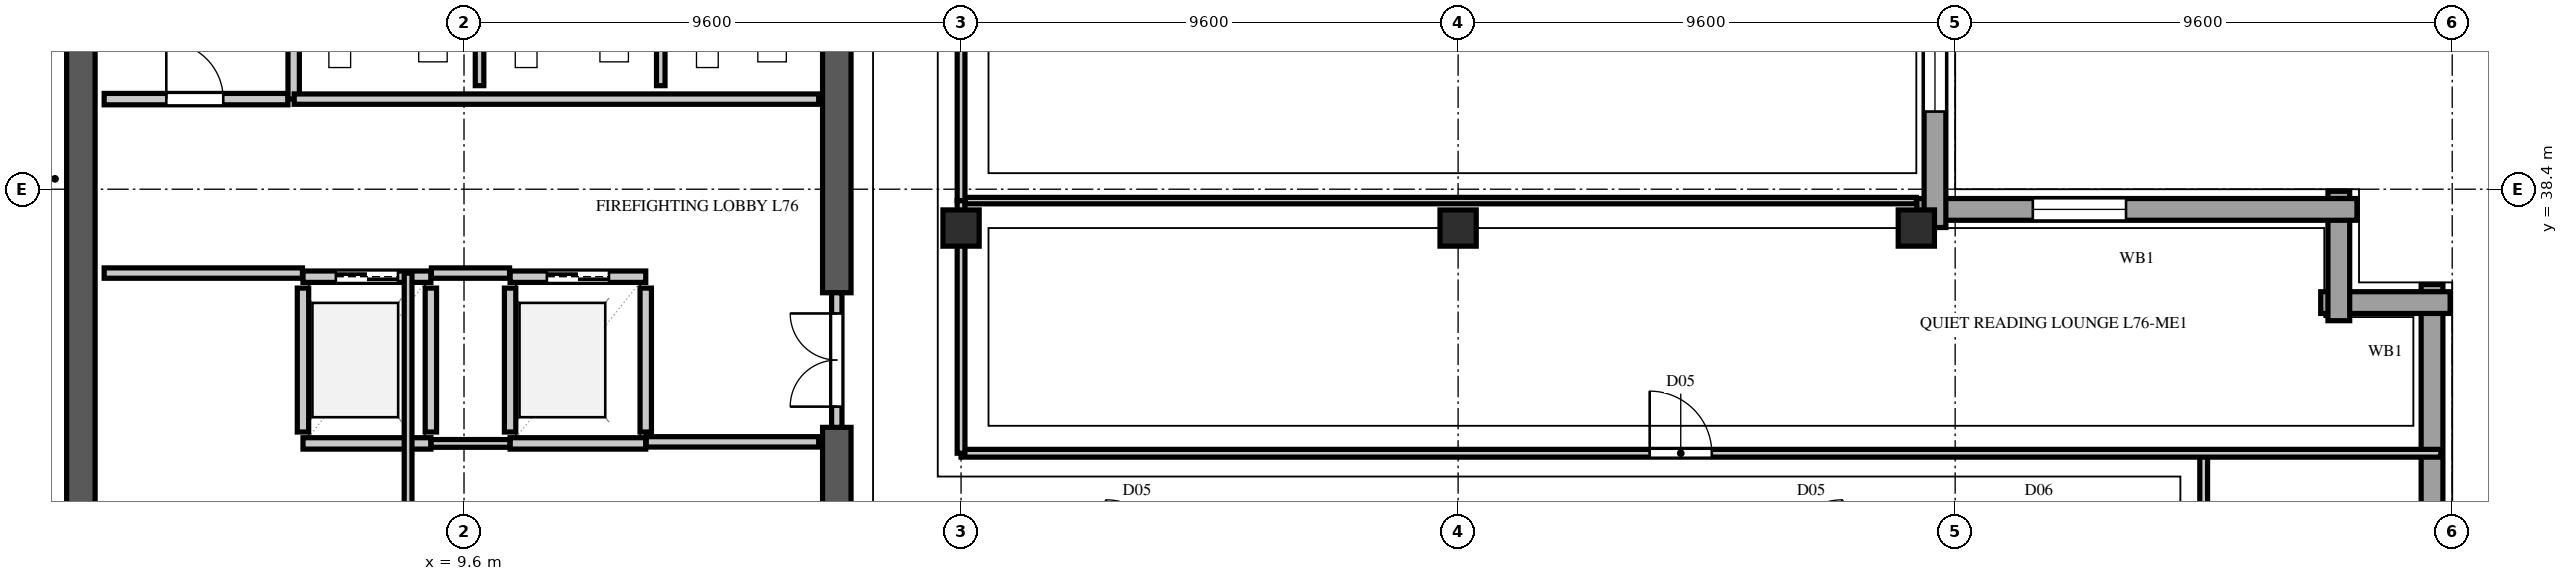
"""IFC4 building model, lengths in metres.
Left out: names, types, materials, properties, quantities, classifications, styles, units other than length and angle.
Written with IfcOpenShell. Run it as: python <this file> out.ifc"""

import sys

from ifc_helpers import new_model, si_unit, direction, frame, frame_2d, origin, origin_2d, place, context, subcontext, project, spatial, rectangle, extrude, element, fill, save


model = new_model("IFC4")
c1 = context("Model", 3, precision=1e-05, world=origin(), true_north=direction((0.0, 1.0)))
c2 = subcontext(c1, "Body", "Model", "MODEL_VIEW")
j1 = project(units=[si_unit("LENGTHUNIT", "METRE"), si_unit("PLANEANGLEUNIT", "RADIAN")], contexts=[c1])
p1 = place(None, origin())
s1 = spatial("IfcSite", under=j1, at=p1, CompositionType="ELEMENT")
p2 = place(p1, origin())
s2 = spatial("IfcBuilding", under=s1, at=p2, CompositionType="ELEMENT")
p3 = place(p2, frame((0.0, 0.0, 300.0)))
s3 = spatial("IfcBuildingStorey", under=s2, at=p3, CompositionType="ELEMENT", Elevation=300.0)
p4 = place(p3, frame((2.2, 9.325, 0.0), z_axis=(0.0, 0.0, 1.0), x_axis=(0.0, 1.0, 0.0)))
e1 = element("IfcWall", 1, at=p4, inside=s3, PredefinedType="SHEAR", context=c2, shape_type="SweptSolid", body=[
    extrude(rectangle(XDim=38.95, YDim=0.55, at=frame_2d((19.475, 0.0))), origin(), (0.0, 0.0, 1.0), 3.54),
])
p5 = place(p3, frame((16.8, 26.0, 0.0), z_axis=(0.0, 0.0, 1.0), x_axis=(0.0, 1.0, 0.0)))
e2 = element("IfcWall", 2, at=p5, inside=s3, PredefinedType="SHEAR", context=c2, shape_type="SweptSolid", body=[
    extrude(rectangle(XDim=7.8, YDim=0.55, at=frame_2d((3.9, 0.0))), origin(), (0.0, 0.0, 1.0), 3.54),
])
p6 = place(p3, frame((16.8, 36.4, 0.0), z_axis=(0.0, 0.0, 1.0), x_axis=(0.0, 1.0, 0.0)))
e3 = element("IfcWall", 3, at=p6, inside=s3, PredefinedType="SHEAR", context=c2, shape_type="SweptSolid", body=[
    extrude(rectangle(XDim=11.325, YDim=0.55, at=frame_2d((5.663, 0.0))), origin(), (0.0, 0.0, 1.0), 3.54),
])
p7 = place(p6, frame((9.2, 0.0, 0.0)))
e4 = element("IfcOpeningElement", 4, at=p7, cuts=e3, PredefinedType="OPENING", context=c2, shape_type="SweptSolid", body=[
    extrude(rectangle(XDim=0.95, YDim=2.15, at=frame_2d((0.475, 1.075))), frame((0.0, 0.287, 0.0), z_axis=(0.0, -1.0, 0.0), x_axis=(1.0, 0.0, 0.0)), (0.0, 0.0, 1.0), 0.574),
])
for number, where, z_axis, x_axis in (
    (5, (19.2, 37.65, 0.0), (0.0, 0.0, 1.0), (1.0, 0.0, 0.0)),
    (6, (28.8, 37.65, 0.0), (0.0, 0.0, 1.0), (1.0, 0.0, 0.0)),
    (7, (37.65, 37.65, 0.0), (0.0, 0.0, 1.0), (1.0, 0.0, 0.0)),
):
    element("IfcColumn", number, at=place(p3, frame(where, z_axis=z_axis, x_axis=x_axis)), inside=s3, PredefinedType="COLUMN", context=c2, shape_type="SweptSolid", body=[
        extrude(rectangle(XDim=0.7, YDim=0.7, at=origin_2d()), origin(), (0.0, 0.0, 1.0), 3.8),
    ])
p8 = place(p3, frame((47.61, 1.84, 0.0), z_axis=(0.0, 0.0, 1.0), x_axis=(0.0, 1.0, 0.0)))
e8 = element("IfcWall", 8, at=p8, inside=s3, PredefinedType="SOLIDWALL", context=c2, shape_type="SweptSolid", body=[
    extrude(rectangle(XDim=34.72, YDim=0.42, at=frame_2d((17.36, 0.0))), origin(), (0.0, 0.0, 1.0), 3.54),
])
p9 = place(p8, frame((4.61, 0.0, 0.85)))
e9 = element("IfcOpeningElement", 9, at=p9, cuts=e8, PredefinedType="OPENING", context=c2, shape_type="SweptSolid", body=[
    extrude(rectangle(XDim=1.5, YDim=1.85, at=frame_2d((0.75, 0.925))), frame((0.0, 0.222, 0.0), z_axis=(0.0, -1.0, 0.0), x_axis=(1.0, 0.0, 0.0)), (0.0, 0.0, 1.0), 0.444),
])
p10 = place(p8, frame((9.41, 0.0, 0.85)))
e10 = element("IfcOpeningElement", 10, at=p10, cuts=e8, PredefinedType="OPENING", context=c2, shape_type="SweptSolid", body=[
    extrude(rectangle(XDim=1.5, YDim=1.85, at=frame_2d((0.75, 0.925))), frame((0.0, 0.222, 0.0), z_axis=(0.0, -1.0, 0.0), x_axis=(1.0, 0.0, 0.0)), (0.0, 0.0, 1.0), 0.444),
])
p11 = place(p8, frame((14.21, 0.0, 0.85)))
e11 = element("IfcOpeningElement", 11, at=p11, cuts=e8, PredefinedType="OPENING", context=c2, shape_type="SweptSolid", body=[
    extrude(rectangle(XDim=1.5, YDim=1.85, at=frame_2d((0.75, 0.925))), frame((0.0, 0.222, 0.0), z_axis=(0.0, -1.0, 0.0), x_axis=(1.0, 0.0, 0.0)), (0.0, 0.0, 1.0), 0.444),
])
p12 = place(p8, frame((19.01, 0.0, 0.85)))
e12 = element("IfcOpeningElement", 12, at=p12, cuts=e8, PredefinedType="OPENING", context=c2, shape_type="SweptSolid", body=[
    extrude(rectangle(XDim=1.5, YDim=1.85, at=frame_2d((0.75, 0.925))), frame((0.0, 0.222, 0.0), z_axis=(0.0, -1.0, 0.0), x_axis=(1.0, 0.0, 0.0)), (0.0, 0.0, 1.0), 0.444),
])
p13 = place(p8, frame((23.81, 0.0, 0.85)))
e13 = element("IfcOpeningElement", 13, at=p13, cuts=e8, PredefinedType="OPENING", context=c2, shape_type="SweptSolid", body=[
    extrude(rectangle(XDim=1.5, YDim=1.85, at=frame_2d((0.75, 0.925))), frame((0.0, 0.222, 0.0), z_axis=(0.0, -1.0, 0.0), x_axis=(1.0, 0.0, 0.0)), (0.0, 0.0, 1.0), 0.444),
])
for number, where, z_axis, x_axis in (
    (14, (47.96, 36.21, 0.0), (0.0, 0.0, 1.0), (-1.0, 0.0, 0.0)),
    (15, (45.81, 35.86, 0.0), (0.0, 0.0, 1.0), (0.0, 1.0, 0.0)),
):
    element("IfcWall", number, at=place(p3, frame(where, z_axis=z_axis, x_axis=x_axis)), inside=s3, PredefinedType="SOLIDWALL", context=c2, shape_type="SweptSolid", body=[
        extrude(rectangle(XDim=2.5, YDim=0.42, at=frame_2d((1.25, 0.0))), origin(), (0.0, 0.0, 1.0), 3.54),
    ])
p14 = place(p3, frame((46.16, 38.01, 0.0), z_axis=(0.0, 0.0, 1.0), x_axis=(-1.0, 0.0, 0.0)))
e16 = element("IfcWall", 16, at=p14, inside=s3, PredefinedType="SOLIDWALL", context=c2, shape_type="SweptSolid", body=[
    extrude(rectangle(XDim=8.5, YDim=0.42, at=frame_2d((4.25, 0.0))), origin(), (0.0, 0.0, 1.0), 3.54),
])
p15 = place(p14, frame((4.46, 0.0, 0.85)))
e17 = element("IfcOpeningElement", 17, at=p15, cuts=e16, PredefinedType="OPENING", context=c2, shape_type="SweptSolid", body=[
    extrude(rectangle(XDim=1.8, YDim=1.85, at=frame_2d((0.9, 0.925))), frame((0.0, 0.222, 0.0), z_axis=(0.0, -1.0, 0.0), x_axis=(1.0, 0.0, 0.0)), (0.0, 0.0, 1.0), 0.444),
])
p16 = place(p3, frame((38.01, 37.66, 0.0), z_axis=(0.0, 0.0, 1.0), x_axis=(0.0, 1.0, 0.0)))
e18 = element("IfcWall", 18, at=p16, inside=s3, PredefinedType="SOLIDWALL", context=c2, shape_type="SweptSolid", body=[
    extrude(rectangle(XDim=8.5, YDim=0.42, at=frame_2d((4.25, 0.0))), origin(), (0.0, 0.0, 1.0), 3.54),
])
p17 = place(p16, frame((2.24, 0.0, 0.85)))
e19 = element("IfcOpeningElement", 19, at=p17, cuts=e18, PredefinedType="OPENING", context=c2, shape_type="SweptSolid", body=[
    extrude(rectangle(XDim=1.8, YDim=1.85, at=frame_2d((0.9, 0.925))), frame((0.0, 0.222, 0.0), z_axis=(0.0, -1.0, 0.0), x_axis=(1.0, 0.0, 0.0)), (0.0, 0.0, 1.0), 0.444),
])
p18 = place(p3, frame((2.65, 40.14, 0.0), z_axis=(0.0, 0.0, 1.0), x_axis=(1.0, 0.0, 0.0)))
e20 = element("IfcWall", 20, at=p18, inside=s3, PredefinedType="SOLIDWALL", context=c2, shape_type="SweptSolid", body=[
    extrude(rectangle(XDim=3.55, YDim=0.22, at=frame_2d((1.775, 0.0))), origin(), (0.0, 0.0, 1.0), 3.54),
])
p19 = place(p18, frame((1.2, 0.0, 0.0)))
e21 = element("IfcOpeningElement", 21, at=p19, cuts=e20, PredefinedType="OPENING", context=c2, shape_type="SweptSolid", body=[
    extrude(rectangle(XDim=1.1, YDim=2.2, at=frame_2d((0.55, 1.1))), frame((0.0, 0.122, 0.0), z_axis=(0.0, -1.0, 0.0), x_axis=(1.0, 0.0, 0.0)), (0.0, 0.0, 1.0), 0.244),
])
p20 = place(p3, frame((6.31, 40.14, 0.0), z_axis=(0.0, 0.0, 1.0), x_axis=(0.0, 1.0, 0.0)))
e22 = element("IfcWall", 22, at=p20, inside=s3, PredefinedType="SOLIDWALL", context=c2, shape_type="SweptSolid", body=[
    extrude(rectangle(XDim=7.81, YDim=0.22, at=frame_2d((3.905, 0.0))), origin(), (0.0, 0.0, 1.0), 3.54),
])
for number, where, z_axis, x_axis in (
    (23, (6.49, 33.71, 0.0), (0.0, 0.0, 1.0), (0.0, 1.0, 0.0)),
    (24, (8.96, 33.71, 0.0), (0.0, 0.0, 1.0), (0.0, 1.0, 0.0)),
):
    element("IfcWall", number, at=place(p3, frame(where, z_axis=z_axis, x_axis=x_axis)), inside=s3, PredefinedType="SOLIDWALL", context=c2, shape_type="SweptSolid", body=[
        extrude(rectangle(XDim=2.78, YDim=0.22, at=frame_2d((1.39, 0.0))), origin(), (0.0, 0.0, 1.0), 3.54),
    ])
p21 = place(p3, frame((6.49, 33.49, 0.0), z_axis=(0.0, 0.0, 1.0), x_axis=(1.0, 0.0, 0.0)))
e25 = element("IfcWall", 25, at=p21, inside=s3, PredefinedType="SOLIDWALL", context=c2, shape_type="SweptSolid", body=[
    extrude(rectangle(XDim=2.47, YDim=0.22, at=frame_2d((1.235, 0.0))), origin(), (0.0, 0.0, 1.0), 3.54),
])
p22 = place(p3, frame((6.49, 36.71, 0.0), z_axis=(0.0, 0.0, 1.0), x_axis=(1.0, 0.0, 0.0)))
e26 = element("IfcWall", 26, at=p22, inside=s3, PredefinedType="SOLIDWALL", context=c2, shape_type="SweptSolid", body=[
    extrude(rectangle(XDim=2.47, YDim=0.22, at=frame_2d((1.235, 0.0))), origin(), (0.0, 0.0, 1.0), 3.54),
])
p23 = place(p22, frame((0.635, 0.0, 0.0)))
e27 = element("IfcOpeningElement", 27, at=p23, cuts=e26, PredefinedType="OPENING", context=c2, shape_type="SweptSolid", body=[
    extrude(rectangle(XDim=1.2, YDim=2.2, at=frame_2d((0.6, 1.1))), frame((0.0, 0.122, 0.0), z_axis=(0.0, -1.0, 0.0), x_axis=(1.0, 0.0, 0.0)), (0.0, 0.0, 1.0), 0.244),
])
for number, where, z_axis, x_axis in (
    (28, (10.49, 33.71, 0.0), (0.0, 0.0, 1.0), (0.0, 1.0, 0.0)),
    (29, (13.11, 33.71, 0.0), (0.0, 0.0, 1.0), (0.0, 1.0, 0.0)),
):
    element("IfcWall", number, at=place(p3, frame(where, z_axis=z_axis, x_axis=x_axis)), inside=s3, PredefinedType="SOLIDWALL", context=c2, shape_type="SweptSolid", body=[
        extrude(rectangle(XDim=2.78, YDim=0.22, at=frame_2d((1.39, 0.0))), origin(), (0.0, 0.0, 1.0), 3.54),
    ])
p24 = place(p3, frame((10.49, 33.49, 0.0), z_axis=(0.0, 0.0, 1.0), x_axis=(1.0, 0.0, 0.0)))
e30 = element("IfcWall", 30, at=p24, inside=s3, PredefinedType="SOLIDWALL", context=c2, shape_type="SweptSolid", body=[
    extrude(rectangle(XDim=2.62, YDim=0.22, at=frame_2d((1.31, 0.0))), origin(), (0.0, 0.0, 1.0), 3.54),
])
p25 = place(p3, frame((10.49, 36.71, 0.0), z_axis=(0.0, 0.0, 1.0), x_axis=(1.0, 0.0, 0.0)))
e31 = element("IfcWall", 31, at=p25, inside=s3, PredefinedType="SOLIDWALL", context=c2, shape_type="SweptSolid", body=[
    extrude(rectangle(XDim=2.62, YDim=0.22, at=frame_2d((1.31, 0.0))), origin(), (0.0, 0.0, 1.0), 3.54),
])
p26 = place(p25, frame((0.71, 0.0, 0.0)))
e32 = element("IfcOpeningElement", 32, at=p26, cuts=e31, PredefinedType="OPENING", context=c2, shape_type="SweptSolid", body=[
    extrude(rectangle(XDim=1.2, YDim=2.2, at=frame_2d((0.6, 1.1))), frame((0.0, 0.122, 0.0), z_axis=(0.0, -1.0, 0.0), x_axis=(1.0, 0.0, 0.0)), (0.0, 0.0, 1.0), 0.244),
])
p27 = place(p3, frame((2.65, 36.78, 0.0), z_axis=(0.0, 0.0, 1.0), x_axis=(1.0, 0.0, 0.0)))
e33 = element("IfcWall", 33, at=p27, inside=s3, PredefinedType="SOLIDWALL", context=c2, shape_type="SweptSolid", body=[
    extrude(rectangle(XDim=3.83, YDim=0.2, at=frame_2d((1.915, 0.0))), origin(), (0.0, 0.0, 1.0), 3.54),
])
p28 = place(p3, frame((8.97, 36.78, 0.0), z_axis=(0.0, 0.0, 1.0), x_axis=(1.0, 0.0, 0.0)))
e34 = element("IfcWall", 34, at=p28, inside=s3, PredefinedType="SOLIDWALL", context=c2, shape_type="SweptSolid", body=[
    extrude(rectangle(XDim=1.51, YDim=0.2, at=frame_2d((0.755, 0.0))), origin(), (0.0, 0.0, 1.0), 3.54),
])
p29 = place(p3, frame((13.12, 33.52, 0.0), z_axis=(0.0, 0.0, 1.0), x_axis=(1.0, 0.0, 0.0)))
e35 = element("IfcWall", 35, at=p29, inside=s3, PredefinedType="SOLIDWALL", context=c2, shape_type="SweptSolid", body=[
    extrude(rectangle(XDim=3.33, YDim=0.2, at=frame_2d((1.665, 0.0))), origin(), (0.0, 0.0, 1.0), 3.54),
])
p30 = place(p3, frame((6.32, 40.14, 0.0), z_axis=(0.0, 0.0, 1.0), x_axis=(1.0, 0.0, 0.0)))
e36 = element("IfcWall", 36, at=p30, inside=s3, PredefinedType="SOLIDWALL", context=c2, shape_type="SweptSolid", body=[
    extrude(rectangle(XDim=10.13, YDim=0.2, at=frame_2d((5.065, 0.0))), origin(), (0.0, 0.0, 1.0), 3.54),
])
p31 = place(p3, frame((16.8, 33.8, 0.0), z_axis=(0.0, 0.0, 1.0), x_axis=(0.0, 1.0, 0.0)))
e37 = element("IfcWall", 37, at=p31, inside=s3, PredefinedType="SOLIDWALL", context=c2, shape_type="SweptSolid", body=[
    extrude(rectangle(XDim=2.6, YDim=0.2, at=frame_2d((1.3, 0.0))), origin(), (0.0, 0.0, 1.0), 3.54),
])
p32 = place(p31, frame((0.4, 0.0, 0.0)))
e38 = element("IfcOpeningElement", 38, at=p32, cuts=e37, PredefinedType="OPENING", context=c2, shape_type="SweptSolid", body=[
    extrude(rectangle(XDim=1.8, YDim=2.2, at=frame_2d((0.9, 1.1))), frame((0.0, 0.112, 0.0), z_axis=(0.0, -1.0, 0.0), x_axis=(1.0, 0.0, 0.0)), (0.0, 0.0, 1.0), 0.224),
])
p33 = place(p3, frame((8.965, 33.49, 0.0), z_axis=(0.0, 0.0, 1.0), x_axis=(1.0, 0.0, 0.0)))
e39 = element("IfcWall", 39, at=p33, inside=s3, PredefinedType="PARTITIONING", context=c2, shape_type="SweptSolid", body=[
    extrude(rectangle(XDim=1.52, YDim=0.15, at=frame_2d((0.76, 0.0))), origin(), (0.0, 0.0, 1.0), 3.54),
])
p34 = place(p3, frame((8.52, 12.02, 0.0), z_axis=(0.0, 0.0, 1.0), x_axis=(0.0, 1.0, 0.0)))
e40 = element("IfcWall", 40, at=p34, inside=s3, PredefinedType="PARTITIONING", context=c2, shape_type="SweptSolid", body=[
    extrude(rectangle(XDim=24.76, YDim=0.15, at=frame_2d((12.38, 0.0))), origin(), (0.0, 0.0, 1.0), 3.54),
])
p35 = place(p34, frame((6.0, 0.0, 0.0)))
e41 = element("IfcOpeningElement", 41, at=p35, cuts=e40, PredefinedType="OPENING", context=c2, shape_type="SweptSolid", body=[
    extrude(rectangle(XDim=0.95, YDim=2.15, at=frame_2d((0.475, 1.075))), frame((0.0, 0.087, 0.0), z_axis=(0.0, -1.0, 0.0), x_axis=(1.0, 0.0, 0.0)), (0.0, 0.0, 1.0), 0.174),
])
p36 = place(p34, frame((14.0, 0.0, 0.0)))
e42 = element("IfcOpeningElement", 42, at=p36, cuts=e40, PredefinedType="OPENING", context=c2, shape_type="SweptSolid", body=[
    extrude(rectangle(XDim=0.95, YDim=2.15, at=frame_2d((0.475, 1.075))), frame((0.0, 0.087, 0.0), z_axis=(0.0, -1.0, 0.0), x_axis=(1.0, 0.0, 0.0)), (0.0, 0.0, 1.0), 0.174),
])
for number, where, z_axis, x_axis in (
    (43, (9.9, 40.4, 0.0), (0.0, 0.0, 1.0), (0.0, 1.0, 0.0)),
    (44, (13.4, 40.4, 0.0), (0.0, 0.0, 1.0), (0.0, 1.0, 0.0)),
):
    element("IfcWall", number, at=place(p3, frame(where, z_axis=z_axis, x_axis=x_axis)), inside=s3, PredefinedType="PLUMBINGWALL", context=c2, shape_type="SweptSolid", body=[
        extrude(rectangle(XDim=4.92, YDim=0.165, at=frame_2d((2.46, 0.0))), origin(), (0.0, 0.0, 1.0), 3.54),
    ])
p37 = place(p3, frame((43.2, 31.2, 0.0), z_axis=(0.0, 0.0, 1.0), x_axis=(0.0, 1.0, 0.0)))
e45 = element("IfcWall", 45, at=p37, inside=s3, PredefinedType="PARTITIONING", context=c2, shape_type="SweptSolid", body=[
    extrude(rectangle(XDim=2.1, YDim=0.15, at=frame_2d((1.05, 0.0))), origin(), (0.0, 0.0, 1.0), 3.54),
])
p38 = place(p3, frame((19.2, 33.3, 0.0), z_axis=(0.0, 0.0, 1.0), x_axis=(1.0, 0.0, 0.0)))
e46 = element("IfcWall", 46, at=p38, inside=s3, PredefinedType="PARTITIONING", context=c2, shape_type="SweptSolid", body=[
    extrude(rectangle(XDim=28.58, YDim=0.15, at=frame_2d((14.29, 0.0))), origin(), (0.0, 0.0, 1.0), 3.54),
])
p39 = place(p38, frame((13.3, 0.0, 0.0)))
e47 = element("IfcOpeningElement", 47, at=p39, cuts=e46, PredefinedType="OPENING", context=c2, shape_type="SweptSolid", body=[
    extrude(rectangle(XDim=1.2, YDim=2.2, at=frame_2d((0.6, 1.1))), frame((0.0, 0.087, 0.0), z_axis=(0.0, -1.0, 0.0), x_axis=(1.0, 0.0, 0.0)), (0.0, 0.0, 1.0), 0.174),
])
p40 = place(p3, frame((19.2, 33.3, 0.0), z_axis=(0.0, 0.0, 1.0), x_axis=(0.0, 1.0, 0.0)))
e48 = element("IfcWall", 48, at=p40, inside=s3, PredefinedType="PARTITIONING", context=c2, shape_type="SweptSolid", body=[
    extrude(rectangle(XDim=4.88, YDim=0.15, at=frame_2d((2.44, 0.0))), origin(), (0.0, 0.0, 1.0), 3.232),
])
p41 = place(p3, frame((19.28, 38.18, 0.0), z_axis=(0.0, 0.0, 1.0), x_axis=(1.0, 0.0, 0.0)))
e49 = element("IfcWall", 49, at=p41, inside=s3, PredefinedType="PARTITIONING", context=c2, shape_type="SweptSolid", body=[
    extrude(rectangle(XDim=18.37, YDim=0.125, at=frame_2d((9.185, 0.0))), origin(), (0.0, 0.0, 1.0), 3.54),
])
p42 = place(p3, frame((19.2, 38.18, 0.0), z_axis=(0.0, 0.0, 1.0), x_axis=(0.0, 1.0, 0.0)))
e50 = element("IfcWall", 50, at=p42, inside=s3, PredefinedType="PARTITIONING", context=c2, shape_type="SweptSolid", body=[
    extrude(rectangle(XDim=9.27, YDim=0.15, at=frame_2d((4.635, 0.0))), origin(), (0.0, 0.0, 1.0), 3.232),
])
p43 = place(p42, frame((3.65, 0.0, 0.0)))
e51 = element("IfcOpeningElement", 51, at=p43, cuts=e50, PredefinedType="OPENING", context=c2, shape_type="SweptSolid", body=[
    extrude(rectangle(XDim=1.2, YDim=2.2, at=frame_2d((0.6, 1.1))), frame((0.0, 0.087, 0.0), z_axis=(0.0, -1.0, 0.0), x_axis=(1.0, 0.0, 0.0)), (0.0, 0.0, 1.0), 0.174),
])
p44 = place(p15, origin())
e52 = element("IfcWindow", 52, at=p44, inside=s3, PartitioningType="DOUBLE_PANEL_VERTICAL", PredefinedType="WINDOW", context=c2, shape_type="SweptSolid", body=[
    extrude(rectangle(XDim=1.8, YDim=1.85, at=frame_2d((0.9, 0.925))), frame((0.0, 0.11, 0.0), z_axis=(0.0, -1.0, 0.0), x_axis=(1.0, 0.0, 0.0)), (0.0, 0.0, 1.0), 0.06),
])
fill(e17, e52)
p45 = place(p17, origin())
e53 = element("IfcWindow", 53, at=p45, inside=s3, PartitioningType="DOUBLE_PANEL_VERTICAL", PredefinedType="WINDOW", context=c2, shape_type="SweptSolid", body=[
    extrude(rectangle(XDim=1.8, YDim=1.85, at=frame_2d((0.9, 0.925))), frame((0.0, 0.11, 0.0), z_axis=(0.0, -1.0, 0.0), x_axis=(1.0, 0.0, 0.0)), (0.0, 0.0, 1.0), 0.06),
])
fill(e19, e53)
p46 = place(p19, origin())
e54 = element("IfcDoor", 54, at=p46, inside=s3, OperationType="SINGLE_SWING_LEFT", PredefinedType="DOOR", context=c2, shape_type="SweptSolid", body=[
    extrude(rectangle(XDim=1.1, YDim=2.2, at=frame_2d((0.55, 1.1))), frame((0.0, 0.025, 0.0), z_axis=(0.0, -1.0, 0.0), x_axis=(1.0, 0.0, 0.0)), (0.0, 0.0, 1.0), 0.05),
])
fill(e21, e54)
p47 = place(p23, origin())
e55 = element("IfcDoor", 55, at=p47, inside=s3, OperationType="DOUBLE_DOOR_SLIDING", PredefinedType="DOOR", context=c2, shape_type="SweptSolid", body=[
    extrude(rectangle(XDim=1.2, YDim=2.2, at=frame_2d((0.6, 1.1))), frame((0.0, 0.025, 0.0), z_axis=(0.0, -1.0, 0.0), x_axis=(1.0, 0.0, 0.0)), (0.0, 0.0, 1.0), 0.05),
])
fill(e27, e55)
p48 = place(p26, origin())
e56 = element("IfcDoor", 56, at=p48, inside=s3, OperationType="DOUBLE_DOOR_SLIDING", PredefinedType="DOOR", context=c2, shape_type="SweptSolid", body=[
    extrude(rectangle(XDim=1.2, YDim=2.2, at=frame_2d((0.6, 1.1))), frame((0.0, 0.025, 0.0), z_axis=(0.0, -1.0, 0.0), x_axis=(1.0, 0.0, 0.0)), (0.0, 0.0, 1.0), 0.05),
])
fill(e32, e56)
p49 = place(p32, origin())
e57 = element("IfcDoor", 57, at=p49, inside=s3, OperationType="DOUBLE_DOOR_SINGLE_SWING", PredefinedType="DOOR", context=c2, shape_type="SweptSolid", body=[
    extrude(rectangle(XDim=1.8, YDim=2.2, at=frame_2d((0.9, 1.1))), frame((0.0, 0.025, 0.0), z_axis=(0.0, -1.0, 0.0), x_axis=(1.0, 0.0, 0.0)), (0.0, 0.0, 1.0), 0.05),
])
fill(e38, e57)
p50 = place(p39, origin())
e58 = element("IfcDoor", 58, at=p50, inside=s3, OperationType="SINGLE_SWING_LEFT", PredefinedType="DOOR", context=c2, shape_type="SweptSolid", body=[
    extrude(rectangle(XDim=1.2, YDim=2.2, at=frame_2d((0.6, 1.1))), frame((0.0, 0.025, 0.0), z_axis=(0.0, -1.0, 0.0), x_axis=(1.0, 0.0, 0.0)), (0.0, 0.0, 1.0), 0.05),
])
fill(e47, e58)
save(model, sys.argv[1])
